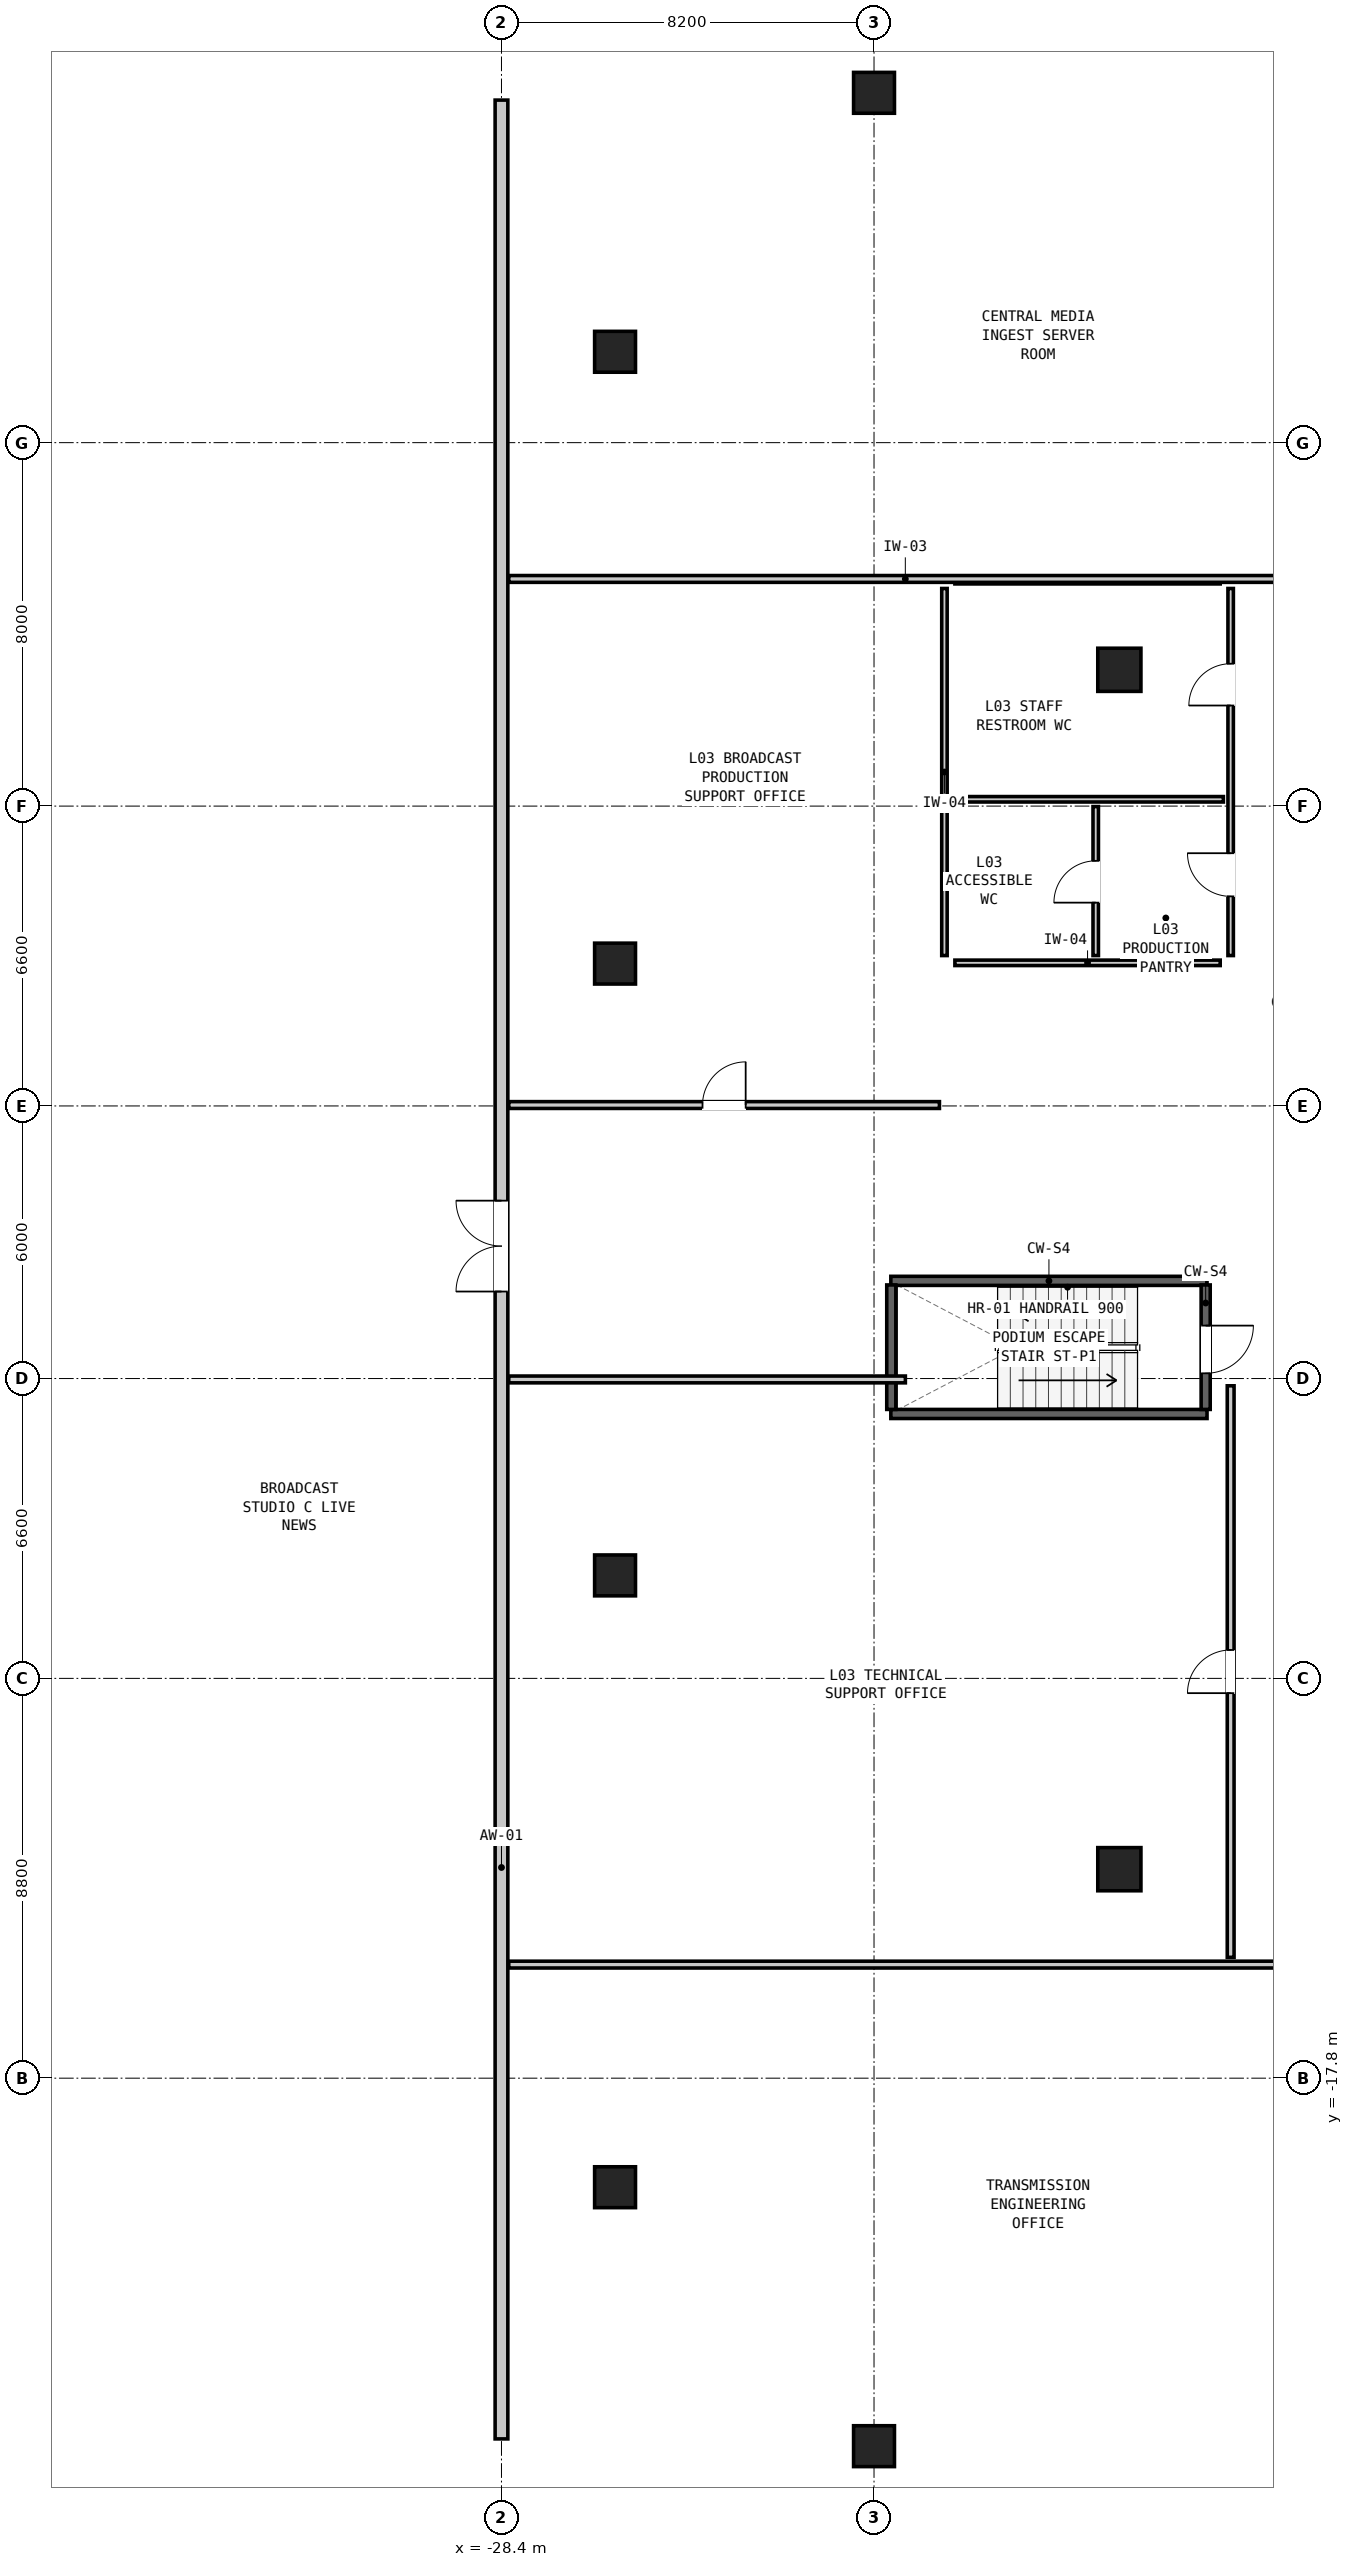
"""IFC4 building model, lengths in metres.
Left out: names, types, materials, properties, quantities, classifications, styles, units other than length and angle.
Written with IfcOpenShell. Run it as: python <this file> out.ifc"""

import sys

from ifc_helpers import new_model, si_unit, direction, frame, frame_2d, origin, origin_2d, place, context, subcontext, project, spatial, rectangle, hollow_rectangle, extrude, element, fill, save


model = new_model("IFC4")
c1 = context("Model", 3, precision=1e-05, world=origin(), true_north=direction((0.0, 1.0)))
c2 = subcontext(c1, "Body", "Model", "MODEL_VIEW")
j1 = project(units=[si_unit("LENGTHUNIT", "METRE"), si_unit("PLANEANGLEUNIT", "RADIAN")], contexts=[c1])
p1 = place(None, origin())
s1 = spatial("IfcSite", under=j1, at=p1, CompositionType="ELEMENT")
p2 = place(p1, origin())
s2 = spatial("IfcBuilding", under=s1, at=p2, CompositionType="ELEMENT")
p3 = place(p2, frame((0.0, 0.0, 13.5)))
s3 = spatial("IfcBuildingStorey", under=s2, at=p3, CompositionType="ELEMENT", Elevation=13.5)
for number, where, z_axis, x_axis in (
    (1, (-14.8, -13.2, 0.0), (0.0, 0.0, 1.0), (1.0, 0.0, 0.0)),
    (2, (-14.8, 13.2, 0.0), (0.0, 0.0, 1.0), (1.0, 0.0, 0.0)),
):
    element("IfcColumn", number, at=place(p3, frame(where, z_axis=z_axis, x_axis=x_axis)), inside=s3, PredefinedType="COLUMN", context=c2, shape_type="SweptSolid", body=[
        extrude(hollow_rectangle(XDim=0.95, YDim=0.95, WallThickness=0.06, at=origin_2d()), origin(), (0.0, 0.0, 1.0), 4.2),
    ])
for number, where, z_axis, x_axis in (
    (3, (-20.2, -25.9, 0.0), (0.0, 0.0, 1.0), (1.0, 0.0, 0.0)),
    (4, (-20.2, 25.9, 0.0), (0.0, 0.0, 1.0), (1.0, 0.0, 0.0)),
    (5, (-25.9, 20.2, 0.0), (0.0, 0.0, 1.0), (0.0, 1.0, 0.0)),
    (6, (-25.9, 6.733, 0.0), (0.0, 0.0, 1.0), (0.0, 1.0, 0.0)),
    (7, (-25.9, -6.733, 0.0), (0.0, 0.0, 1.0), (0.0, 1.0, 0.0)),
    (8, (-25.9, -20.2, 0.0), (0.0, 0.0, 1.0), (0.0, 1.0, 0.0)),
):
    element("IfcColumn", number, at=place(p3, frame(where, z_axis=z_axis, x_axis=x_axis)), inside=s3, PredefinedType="COLUMN", context=c2, shape_type="SweptSolid", body=[
        extrude(hollow_rectangle(XDim=0.9, YDim=0.9, WallThickness=0.055, at=origin_2d()), origin(), (0.0, 0.0, 1.0), 4.2),
    ])
for number, where, z_axis, x_axis in (
    (9, (-19.83, -0.25, 0.0), (0.0, 0.0, 1.0), (1.0, 0.0, 0.0)),
    (10, (-19.83, -3.18, 0.0), (0.0, 0.0, 1.0), (1.0, 0.0, 0.0)),
):
    element("IfcWall", number, at=place(p3, frame(where, z_axis=z_axis, x_axis=x_axis)), inside=s3, PredefinedType="SHEAR", context=c2, shape_type="SweptSolid", body=[
        extrude(rectangle(XDim=6.96, YDim=0.2, at=frame_2d((3.48, 0.0))), origin(), (0.0, 0.0, 1.0), 3.88),
    ])
p4 = place(p3, frame((-12.9, -0.34, 0.0), z_axis=(0.0, 0.0, 1.0), x_axis=(0.0, -1.0, 0.0)))
e11 = element("IfcWall", 11, at=p4, inside=s3, PredefinedType="SHEAR", context=c2, shape_type="SweptSolid", body=[
    extrude(rectangle(XDim=2.74, YDim=0.2, at=frame_2d((1.37, 0.0))), origin(), (0.0, 0.0, 1.0), 3.88),
])
p5 = place(p4, frame((0.895, 0.0, 0.0)))
e12 = element("IfcOpeningElement", 12, at=p5, cuts=e11, PredefinedType="OPENING", context=c2, shape_type="SweptSolid", body=[
    extrude(rectangle(XDim=1.05, YDim=2.08, at=frame_2d((0.525, 1.04))), frame((0.0, 0.112, 0.0), z_axis=(0.0, -1.0, 0.0), x_axis=(1.0, 0.0, 0.0)), (0.0, 0.0, 1.0), 0.224),
])
p6 = place(p3, frame((-19.82, -3.08, 0.0), z_axis=(0.0, 0.0, 1.0), x_axis=(0.0, 1.0, 0.0)))
e13 = element("IfcWall", 13, at=p6, inside=s3, PredefinedType="SHEAR", context=c2, shape_type="SweptSolid", body=[
    extrude(rectangle(XDim=2.74, YDim=0.2, at=frame_2d((1.37, 0.0))), origin(), (0.0, 0.0, 1.0), 3.88),
])
for number, where, z_axis, x_axis in (
    (14, (-18.42, 6.75, 0.0), (0.0, 0.0, 1.0), (1.0, 0.0, 0.0)),
    (15, (-18.42, 15.15, 0.0), (0.0, 0.0, 1.0), (1.0, 0.0, 0.0)),
):
    element("IfcWall", number, at=place(p3, frame(where, z_axis=z_axis, x_axis=x_axis)), inside=s3, PredefinedType="PARTITIONING", context=c2, shape_type="SweptSolid", body=[
        extrude(rectangle(XDim=5.84, YDim=0.12, at=frame_2d((2.92, 0.0))), origin(), (0.0, 0.0, 1.0), 3.88),
    ])
p7 = place(p3, frame((-18.65, 6.91, 0.0), z_axis=(0.0, 0.0, 1.0), x_axis=(0.0, 1.0, 0.0)))
e16 = element("IfcWall", 16, at=p7, inside=s3, PredefinedType="PARTITIONING", context=c2, shape_type="SweptSolid", body=[
    extrude(rectangle(XDim=8.08, YDim=0.12, at=frame_2d((4.04, 0.0))), origin(), (0.0, 0.0, 1.0), 3.88),
])
p8 = place(p3, frame((-18.49, 10.35, 0.0), z_axis=(0.0, 0.0, 1.0), x_axis=(1.0, 0.0, 0.0)))
e17 = element("IfcWall", 17, at=p8, inside=s3, PredefinedType="PARTITIONING", context=c2, shape_type="SweptSolid", body=[
    extrude(rectangle(XDim=5.98, YDim=0.12, at=frame_2d((2.99, 0.0))), origin(), (0.0, 0.0, 1.0), 3.88),
])
p9 = place(p3, frame((-15.32, 6.91, 0.0), z_axis=(0.0, 0.0, 1.0), x_axis=(0.0, 1.0, 0.0)))
e18 = element("IfcWall", 18, at=p9, inside=s3, PredefinedType="PARTITIONING", context=c2, shape_type="SweptSolid", body=[
    extrude(rectangle(XDim=3.28, YDim=0.12, at=frame_2d((1.64, 0.0))), origin(), (0.0, 0.0, 1.0), 3.88),
])
p10 = place(p9, frame((1.165, 0.0, 0.0)))
e19 = element("IfcOpeningElement", 19, at=p10, cuts=e18, PredefinedType="OPENING", context=c2, shape_type="SweptSolid", body=[
    extrude(rectangle(XDim=0.92, YDim=2.1, at=frame_2d((0.46, 1.05))), frame((0.0, 0.072, 0.0), z_axis=(0.0, -1.0, 0.0), x_axis=(1.0, 0.0, 0.0)), (0.0, 0.0, 1.0), 0.144),
])
p11 = place(p3, frame((-12.35, 6.91, 0.0), z_axis=(0.0, 0.0, 1.0), x_axis=(0.0, 1.0, 0.0)))
e20 = element("IfcWall", 20, at=p11, inside=s3, PredefinedType="PARTITIONING", context=c2, shape_type="SweptSolid", body=[
    extrude(rectangle(XDim=8.08, YDim=0.12, at=frame_2d((4.04, 0.0))), origin(), (0.0, 0.0, 1.0), 3.88),
])
p12 = place(p11, frame((1.303, 0.0, 0.0)))
e21 = element("IfcOpeningElement", 21, at=p12, cuts=e20, PredefinedType="OPENING", context=c2, shape_type="SweptSolid", body=[
    extrude(rectangle(XDim=0.95, YDim=2.1, at=frame_2d((0.475, 1.05))), frame((0.0, 0.072, 0.0), z_axis=(0.0, -1.0, 0.0), x_axis=(1.0, 0.0, 0.0)), (0.0, 0.0, 1.0), 0.144),
])
p13 = place(p11, frame((5.504, 0.0, 0.0)))
e22 = element("IfcOpeningElement", 22, at=p13, cuts=e20, PredefinedType="OPENING", context=c2, shape_type="SweptSolid", body=[
    extrude(rectangle(XDim=0.92, YDim=2.1, at=frame_2d((0.46, 1.05))), frame((0.0, 0.072, 0.0), z_axis=(0.0, -1.0, 0.0), x_axis=(1.0, 0.0, 0.0)), (0.0, 0.0, 1.0), 0.144),
])
p14 = place(p3, frame((-28.4, -25.74, 0.0), z_axis=(0.0, 0.0, 1.0), x_axis=(0.0, 1.0, 0.0)))
e23 = element("IfcWall", 23, at=p14, inside=s3, PredefinedType="MOVABLE", context=c2, shape_type="SweptSolid", body=[
    extrude(rectangle(XDim=51.48, YDim=0.28, at=frame_2d((25.74, 0.0))), origin(), (0.0, 0.0, 1.0), 3.88),
])
p15 = place(p14, frame((25.255, 0.0, 0.0)))
e24 = element("IfcOpeningElement", 24, at=p15, cuts=e23, PredefinedType="OPENING", context=c2, shape_type="SweptSolid", body=[
    extrude(rectangle(XDim=2.0, YDim=2.14, at=frame_2d((1.0, 1.07))), frame((0.0, 0.152, 0.0), z_axis=(0.0, -1.0, 0.0), x_axis=(1.0, 0.0, 0.0)), (0.0, 0.0, 1.0), 0.304),
])
p16 = place(p3, frame((-28.24, 15.2, 0.0), z_axis=(0.0, 0.0, 1.0), x_axis=(1.0, 0.0, 0.0)))
e25 = element("IfcWall", 25, at=p16, inside=s3, PredefinedType="PARTITIONING", context=c2, shape_type="SweptSolid", body=[
    extrude(rectangle(XDim=23.28, YDim=0.15, at=frame_2d((11.64, 0.0))), origin(), (0.0, 0.0, 1.0), 3.88),
])
p17 = place(p16, frame((17.558, 0.0, 0.0)))
e26 = element("IfcOpeningElement", 26, at=p17, cuts=e25, PredefinedType="OPENING", context=c2, shape_type="SweptSolid", body=[
    extrude(rectangle(XDim=1.2, YDim=2.1, at=frame_2d((0.6, 1.05))), frame((0.0, 0.087, 0.0), z_axis=(0.0, -1.0, 0.0), x_axis=(1.0, 0.0, 0.0)), (0.0, 0.0, 1.0), 0.174),
])
p18 = place(p3, frame((-28.24, -15.3, 0.0), z_axis=(0.0, 0.0, 1.0), x_axis=(1.0, 0.0, 0.0)))
e27 = element("IfcWall", 27, at=p18, inside=s3, PredefinedType="PARTITIONING", context=c2, shape_type="SweptSolid", body=[
    extrude(rectangle(XDim=23.28, YDim=0.15, at=frame_2d((11.64, 0.0))), origin(), (0.0, 0.0, 1.0), 3.88),
])
p19 = place(p18, frame((17.558, 0.0, 0.0)))
e28 = element("IfcOpeningElement", 28, at=p19, cuts=e27, PredefinedType="OPENING", context=c2, shape_type="SweptSolid", body=[
    extrude(rectangle(XDim=1.2, YDim=2.1, at=frame_2d((0.6, 1.05))), frame((0.0, 0.087, 0.0), z_axis=(0.0, -1.0, 0.0), x_axis=(1.0, 0.0, 0.0)), (0.0, 0.0, 1.0), 0.174),
])
p20 = place(p3, frame((-12.35, -15.14, 0.0), z_axis=(0.0, 0.0, 1.0), x_axis=(0.0, 1.0, 0.0)))
e29 = element("IfcWall", 29, at=p20, inside=s3, PredefinedType="PARTITIONING", context=c2, shape_type="SweptSolid", body=[
    extrude(rectangle(XDim=12.58, YDim=0.15, at=frame_2d((6.29, 0.0))), origin(), (0.0, 0.0, 1.0), 3.88),
])
p21 = place(p20, frame((5.815, 0.0, 0.0)))
e30 = element("IfcOpeningElement", 30, at=p21, cuts=e29, PredefinedType="OPENING", context=c2, shape_type="SweptSolid", body=[
    extrude(rectangle(XDim=0.95, YDim=2.1, at=frame_2d((0.475, 1.05))), frame((0.0, 0.087, 0.0), z_axis=(0.0, -1.0, 0.0), x_axis=(1.0, 0.0, 0.0)), (0.0, 0.0, 1.0), 0.174),
])
p22 = place(p3, frame((-28.24, -2.42, 0.0), z_axis=(0.0, 0.0, 1.0), x_axis=(1.0, 0.0, 0.0)))
e31 = element("IfcWall", 31, at=p22, inside=s3, PredefinedType="PARTITIONING", context=c2, shape_type="SweptSolid", body=[
    extrude(rectangle(XDim=8.73, YDim=0.15, at=frame_2d((4.365, 0.0))), origin(), (0.0, 0.0, 1.0), 2.742),
])
p23 = place(p3, frame((-28.24, 3.62, 0.0), z_axis=(0.0, 0.0, 1.0), x_axis=(1.0, 0.0, 0.0)))
e32 = element("IfcWall", 32, at=p23, inside=s3, PredefinedType="PARTITIONING", context=c2, shape_type="SweptSolid", body=[
    extrude(rectangle(XDim=9.48, YDim=0.15, at=frame_2d((4.74, 0.0))), origin(), (0.0, 0.0, 1.0), 2.742),
])
p24 = place(p23, frame((4.265, 0.0, 0.0)))
e33 = element("IfcOpeningElement", 33, at=p24, cuts=e32, PredefinedType="OPENING", context=c2, shape_type="SweptSolid", body=[
    extrude(rectangle(XDim=0.95, YDim=2.1, at=frame_2d((0.475, 1.05))), frame((0.0, 0.087, 0.0), z_axis=(0.0, -1.0, 0.0), x_axis=(1.0, 0.0, 0.0)), (0.0, 0.0, 1.0), 0.174),
])
p25 = place(p5, origin())
e34 = element("IfcDoor", 34, at=p25, inside=s3, OperationType="SINGLE_SWING_LEFT", PredefinedType="DOOR", context=c2, shape_type="SweptSolid", body=[
    extrude(rectangle(XDim=1.05, YDim=2.08, at=frame_2d((0.525, 1.04))), frame((0.0, 0.025, 0.0), z_axis=(0.0, -1.0, 0.0), x_axis=(1.0, 0.0, 0.0)), (0.0, 0.0, 1.0), 0.05),
])
fill(e12, e34)
p26 = place(p10, origin())
e35 = element("IfcDoor", 35, at=p26, inside=s3, OperationType="SINGLE_SWING_LEFT", PredefinedType="DOOR", context=c2, shape_type="SweptSolid", body=[
    extrude(rectangle(XDim=0.92, YDim=2.1, at=frame_2d((0.46, 1.05))), frame((0.0, 0.025, 0.0), z_axis=(0.0, -1.0, 0.0), x_axis=(1.0, 0.0, 0.0)), (0.0, 0.0, 1.0), 0.05),
])
fill(e19, e35)
p27 = place(p12, origin())
e36 = element("IfcDoor", 36, at=p27, inside=s3, OperationType="SINGLE_SWING_RIGHT", PredefinedType="DOOR", context=c2, shape_type="SweptSolid", body=[
    extrude(rectangle(XDim=0.95, YDim=2.1, at=frame_2d((0.475, 1.05))), frame((0.0, 0.025, 0.0), z_axis=(0.0, -1.0, 0.0), x_axis=(1.0, 0.0, 0.0)), (0.0, 0.0, 1.0), 0.05),
])
fill(e21, e36)
p28 = place(p13, origin())
e37 = element("IfcDoor", 37, at=p28, inside=s3, OperationType="SINGLE_SWING_LEFT", PredefinedType="DOOR", context=c2, shape_type="SweptSolid", body=[
    extrude(rectangle(XDim=0.92, YDim=2.1, at=frame_2d((0.46, 1.05))), frame((0.0, 0.025, 0.0), z_axis=(0.0, -1.0, 0.0), x_axis=(1.0, 0.0, 0.0)), (0.0, 0.0, 1.0), 0.05),
])
fill(e22, e37)
p29 = place(p15, origin())
e38 = element("IfcDoor", 38, at=p29, inside=s3, OperationType="DOUBLE_DOOR_SINGLE_SWING", PredefinedType="DOOR", context=c2, shape_type="SweptSolid", body=[
    extrude(rectangle(XDim=2.0, YDim=2.14, at=frame_2d((1.0, 1.07))), frame((0.0, 0.025, 0.0), z_axis=(0.0, -1.0, 0.0), x_axis=(1.0, 0.0, 0.0)), (0.0, 0.0, 1.0), 0.05),
])
fill(e24, e38)
p30 = place(p21, origin())
e39 = element("IfcDoor", 39, at=p30, inside=s3, OperationType="SINGLE_SWING_LEFT", PredefinedType="DOOR", context=c2, shape_type="SweptSolid", body=[
    extrude(rectangle(XDim=0.95, YDim=2.1, at=frame_2d((0.475, 1.05))), frame((0.0, 0.025, 0.0), z_axis=(0.0, -1.0, 0.0), x_axis=(1.0, 0.0, 0.0)), (0.0, 0.0, 1.0), 0.05),
])
fill(e30, e39)
p31 = place(p24, origin())
e40 = element("IfcDoor", 40, at=p31, inside=s3, OperationType="SINGLE_SWING_RIGHT", PredefinedType="DOOR", context=c2, shape_type="SweptSolid", body=[
    extrude(rectangle(XDim=0.95, YDim=2.1, at=frame_2d((0.475, 1.05))), frame((0.0, 0.025, 0.0), z_axis=(0.0, -1.0, 0.0), x_axis=(1.0, 0.0, 0.0)), (0.0, 0.0, 1.0), 0.05),
])
fill(e33, e40)
save(model, sys.argv[1])
